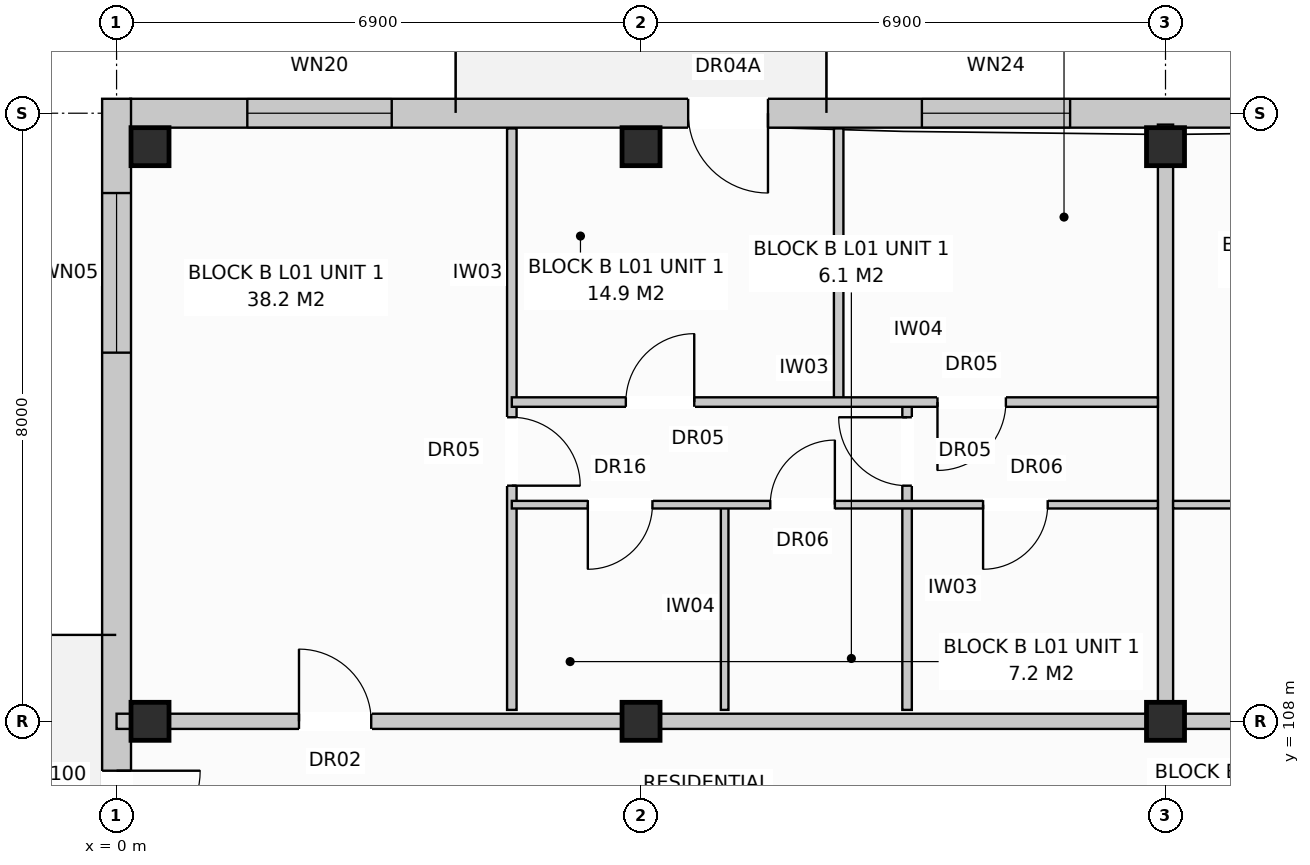
"""IFC4 building model, lengths in metres.
Left out: names, types, materials, properties, quantities, classifications, styles, units other than length and angle.
Written with IfcOpenShell. Run it as: python <this file> out.ifc"""

import sys

from ifc_helpers import new_model, si_unit, direction, frame, frame_2d, origin, origin_with_axes, origin_2d, place, context, subcontext, project, spatial, rectangle, extrude, element, fill, save


model = new_model("IFC4")
c1 = context("Model", 3, precision=1e-05, world=origin(), true_north=direction((0.0, 1.0)))
c2 = subcontext(c1, "Body", "Model", "MODEL_VIEW")
j1 = project(units=[si_unit("LENGTHUNIT", "METRE"), si_unit("PLANEANGLEUNIT", "RADIAN")], contexts=[c1])
p1 = place(None, origin())
s1 = spatial("IfcSite", under=j1, at=p1, CompositionType="ELEMENT")
p2 = place(p1, origin())
s2 = spatial("IfcBuilding", under=s1, at=p2, CompositionType="ELEMENT")
p3 = place(p2, frame((0.0, 0.0, 4.4)))
s3 = spatial("IfcBuildingStorey", under=s2, at=p3, CompositionType="ELEMENT", Elevation=4.4)
for number, where, z_axis, x_axis in (
    (1, (0.44, 108.0, 0.0), (0.0, 0.0, 1.0), (1.0, 0.0, 0.0)),
    (2, (0.44, 115.56, 0.0), (0.0, 0.0, 1.0), (1.0, 0.0, 0.0)),
    (3, (6.9, 108.0, 0.0), (0.0, 0.0, 1.0), (1.0, 0.0, 0.0)),
    (4, (6.9, 115.56, 0.0), (0.0, 0.0, 1.0), (1.0, 0.0, 0.0)),
    (5, (13.8, 108.0, 0.0), (0.0, 0.0, 1.0), (1.0, 0.0, 0.0)),
    (6, (13.8, 115.56, 0.0), (0.0, 0.0, 1.0), (1.0, 0.0, 0.0)),
):
    element("IfcColumn", number, at=place(p3, frame(where, z_axis=z_axis, x_axis=x_axis)), inside=s3, PredefinedType="COLUMN", context=c2, shape_type="SweptSolid", body=[
        extrude(rectangle(XDim=0.5, YDim=0.5, at=origin_2d()), origin(), (0.0, 0.0, 1.0), 3.6),
    ])
p4 = place(p3, frame((0.18, 116.0, 0.0), z_axis=(0.0, 0.0, 1.0), x_axis=(1.0, 0.0, 0.0)))
e7 = element("IfcWall", 7, at=p4, inside=s3, PredefinedType="STANDARD", context=c2, shape_type="SweptSolid", body=[
    extrude(rectangle(XDim=54.84, YDim=0.38, at=frame_2d((27.42, 0.0))), origin(), (0.0, 0.0, 1.0), 3.33),
])
p5 = place(p4, frame((7.34, 0.0, 0.0)))
e8 = element("IfcOpeningElement", 8, at=p5, cuts=e7, PredefinedType="OPENING", context=c2, shape_type="SweptSolid", body=[
    extrude(rectangle(XDim=1.05, YDim=2.12, at=frame_2d((0.525, 1.06))), frame((0.0, 0.202, 0.0), z_axis=(0.0, -1.0, 0.0), x_axis=(1.0, 0.0, 0.0)), (0.0, 0.0, 1.0), 0.404),
])
p6 = place(p4, frame((18.851, 0.0, 0.0)))
e9 = element("IfcOpeningElement", 9, at=p6, cuts=e7, PredefinedType="OPENING", context=c2, shape_type="SweptSolid", body=[
    extrude(rectangle(XDim=1.05, YDim=2.12, at=frame_2d((0.525, 1.06))), frame((0.0, 0.202, 0.0), z_axis=(0.0, -1.0, 0.0), x_axis=(1.0, 0.0, 0.0)), (0.0, 0.0, 1.0), 0.404),
])
p7 = place(p4, frame((32.651, 0.0, 0.0)))
e10 = element("IfcOpeningElement", 10, at=p7, cuts=e7, PredefinedType="OPENING", context=c2, shape_type="SweptSolid", body=[
    extrude(rectangle(XDim=1.05, YDim=2.12, at=frame_2d((0.525, 1.06))), frame((0.0, 0.202, 0.0), z_axis=(0.0, -1.0, 0.0), x_axis=(1.0, 0.0, 0.0)), (0.0, 0.0, 1.0), 0.404),
])
p8 = place(p4, frame((48.74, 0.0, 0.0)))
e11 = element("IfcOpeningElement", 11, at=p8, cuts=e7, PredefinedType="OPENING", context=c2, shape_type="SweptSolid", body=[
    extrude(rectangle(XDim=1.05, YDim=2.12, at=frame_2d((0.525, 1.06))), frame((0.0, 0.202, 0.0), z_axis=(0.0, -1.0, 0.0), x_axis=(1.0, 0.0, 0.0)), (0.0, 0.0, 1.0), 0.404),
])
p9 = place(p4, frame((1.54, 0.0, 0.8)))
e12 = element("IfcOpeningElement", 12, at=p9, cuts=e7, PredefinedType="OPENING", context=c2, shape_type="SweptSolid", body=[
    extrude(rectangle(XDim=1.9, YDim=1.85, at=frame_2d((0.95, 0.925))), frame((0.0, 0.202, 0.0), z_axis=(0.0, -1.0, 0.0), x_axis=(1.0, 0.0, 0.0)), (0.0, 0.0, 1.0), 0.404),
])
p10 = place(p4, frame((10.415, 0.0, 0.8)))
e13 = element("IfcOpeningElement", 13, at=p10, cuts=e7, PredefinedType="OPENING", context=c2, shape_type="SweptSolid", body=[
    extrude(rectangle(XDim=1.95, YDim=1.65, at=frame_2d((0.975, 0.825))), frame((0.0, 0.202, 0.0), z_axis=(0.0, -1.0, 0.0), x_axis=(1.0, 0.0, 0.0)), (0.0, 0.0, 1.0), 0.404),
])
p11 = place(p4, frame((14.89, 0.0, 0.8)))
e14 = element("IfcOpeningElement", 14, at=p11, cuts=e7, PredefinedType="OPENING", context=c2, shape_type="SweptSolid", body=[
    extrude(rectangle(XDim=1.8, YDim=1.7, at=frame_2d((0.9, 0.85))), frame((0.0, 0.202, 0.0), z_axis=(0.0, -1.0, 0.0), x_axis=(1.0, 0.0, 0.0)), (0.0, 0.0, 1.0), 0.404),
])
p12 = place(p4, frame((21.09, 0.0, 0.9)))
e15 = element("IfcOpeningElement", 15, at=p12, cuts=e7, PredefinedType="OPENING", context=c2, shape_type="SweptSolid", body=[
    extrude(rectangle(XDim=0.95, YDim=1.55, at=frame_2d((0.475, 0.775))), frame((0.0, 0.202, 0.0), z_axis=(0.0, -1.0, 0.0), x_axis=(1.0, 0.0, 0.0)), (0.0, 0.0, 1.0), 0.404),
])
p13 = place(p4, frame((23.815, 0.0, 0.8)))
e16 = element("IfcOpeningElement", 16, at=p13, cuts=e7, PredefinedType="OPENING", context=c2, shape_type="SweptSolid", body=[
    extrude(rectangle(XDim=1.95, YDim=1.65, at=frame_2d((0.975, 0.825))), frame((0.0, 0.202, 0.0), z_axis=(0.0, -1.0, 0.0), x_axis=(1.0, 0.0, 0.0)), (0.0, 0.0, 1.0), 0.404),
])
p14 = place(p4, frame((28.49, 0.0, 0.8)))
e17 = element("IfcOpeningElement", 17, at=p14, cuts=e7, PredefinedType="OPENING", context=c2, shape_type="SweptSolid", body=[
    extrude(rectangle(XDim=1.8, YDim=1.7, at=frame_2d((0.9, 0.85))), frame((0.0, 0.202, 0.0), z_axis=(0.0, -1.0, 0.0), x_axis=(1.0, 0.0, 0.0)), (0.0, 0.0, 1.0), 0.404),
])
p15 = place(p4, frame((35.34, 0.0, 0.8)))
e18 = element("IfcOpeningElement", 18, at=p15, cuts=e7, PredefinedType="OPENING", context=c2, shape_type="SweptSolid", body=[
    extrude(rectangle(XDim=1.9, YDim=1.85, at=frame_2d((0.95, 0.925))), frame((0.0, 0.202, 0.0), z_axis=(0.0, -1.0, 0.0), x_axis=(1.0, 0.0, 0.0)), (0.0, 0.0, 1.0), 0.404),
])
p16 = place(p4, frame((38.455, 0.0, 0.8)))
e19 = element("IfcOpeningElement", 19, at=p16, cuts=e7, PredefinedType="OPENING", context=c2, shape_type="SweptSolid", body=[
    extrude(rectangle(XDim=1.95, YDim=1.65, at=frame_2d((0.975, 0.825))), frame((0.0, 0.202, 0.0), z_axis=(0.0, -1.0, 0.0), x_axis=(1.0, 0.0, 0.0)), (0.0, 0.0, 1.0), 0.404),
])
p17 = place(p4, frame((42.99, 0.0, 0.8)))
e20 = element("IfcOpeningElement", 20, at=p17, cuts=e7, PredefinedType="OPENING", context=c2, shape_type="SweptSolid", body=[
    extrude(rectangle(XDim=1.8, YDim=1.7, at=frame_2d((0.9, 0.85))), frame((0.0, 0.202, 0.0), z_axis=(0.0, -1.0, 0.0), x_axis=(1.0, 0.0, 0.0)), (0.0, 0.0, 1.0), 0.404),
])
p18 = place(p4, frame((51.84, 0.0, 0.8)))
e21 = element("IfcOpeningElement", 21, at=p18, cuts=e7, PredefinedType="OPENING", context=c2, shape_type="SweptSolid", body=[
    extrude(rectangle(XDim=1.9, YDim=1.85, at=frame_2d((0.95, 0.925))), frame((0.0, 0.202, 0.0), z_axis=(0.0, -1.0, 0.0), x_axis=(1.0, 0.0, 0.0)), (0.0, 0.0, 1.0), 0.404),
])
p19 = place(p3, frame((0.0, 97.41, 0.0), z_axis=(0.0, 0.0, 1.0), x_axis=(0.0, 1.0, 0.0)))
e22 = element("IfcWall", 22, at=p19, inside=s3, PredefinedType="STANDARD", context=c2, shape_type="SweptSolid", body=[
    extrude(rectangle(XDim=18.78, YDim=0.38, at=frame_2d((9.39, 0.0))), origin(), (0.0, 0.0, 1.0), 3.33),
])
p20 = place(p19, frame((8.84, 0.0, 0.0)))
e23 = element("IfcOpeningElement", 23, at=p20, cuts=e22, PredefinedType="OPENING", context=c2, shape_type="SweptSolid", body=[
    extrude(rectangle(XDim=1.1, YDim=2.1, at=frame_2d((0.55, 1.05))), frame((0.0, 0.202, 0.0), z_axis=(0.0, -1.0, 0.0), x_axis=(1.0, 0.0, 0.0)), (0.0, 0.0, 1.0), 0.404),
])
p21 = place(p19, frame((1.24, 0.0, 0.72)))
e24 = element("IfcOpeningElement", 24, at=p21, cuts=e22, PredefinedType="OPENING", context=c2, shape_type="SweptSolid", body=[
    extrude(rectangle(XDim=2.1, YDim=1.9, at=frame_2d((1.05, 0.95))), frame((0.0, 0.202, 0.0), z_axis=(0.0, -1.0, 0.0), x_axis=(1.0, 0.0, 0.0)), (0.0, 0.0, 1.0), 0.404),
])
p22 = place(p19, frame((15.44, 0.0, 0.72)))
e25 = element("IfcOpeningElement", 25, at=p22, cuts=e22, PredefinedType="OPENING", context=c2, shape_type="SweptSolid", body=[
    extrude(rectangle(XDim=2.1, YDim=1.9, at=frame_2d((1.05, 0.95))), frame((0.0, 0.202, 0.0), z_axis=(0.0, -1.0, 0.0), x_axis=(1.0, 0.0, 0.0)), (0.0, 0.0, 1.0), 0.404),
])
p23 = place(p3, frame((13.8, 108.15, 0.0), z_axis=(0.0, 0.0, 1.0), x_axis=(0.0, 1.0, 0.0)))
e26 = element("IfcWall", 26, at=p23, inside=s3, PredefinedType="PARTITIONING", context=c2, shape_type="SweptSolid", body=[
    extrude(rectangle(XDim=7.7, YDim=0.2, at=frame_2d((3.85, 0.0))), origin(), (0.0, 0.0, 1.0), 3.33),
])
p24 = place(p3, frame((0.0, 108.0, 0.0), z_axis=(0.0, 0.0, 1.0), x_axis=(1.0, 0.0, 0.0)))
e27 = element("IfcWall", 27, at=p24, inside=s3, PredefinedType="PARTITIONING", context=c2, shape_type="SweptSolid", body=[
    extrude(rectangle(XDim=13.8, YDim=0.2, at=frame_2d((6.9, 0.0))), origin(), (0.0, 0.0, 1.0), 2.77),
])
p25 = place(p24, frame((2.4, 0.0, 0.0)))
e28 = element("IfcOpeningElement", 28, at=p25, cuts=e27, PredefinedType="OPENING", context=c2, shape_type="SweptSolid", body=[
    extrude(rectangle(XDim=0.95, YDim=2.15, at=frame_2d((0.475, 1.075))), frame((0.0, 0.112, 0.0), z_axis=(0.0, -1.0, 0.0), x_axis=(1.0, 0.0, 0.0)), (0.0, 0.0, 1.0), 0.224),
])
p26 = place(p3, frame((5.2, 108.15, 0.0), z_axis=(0.0, 0.0, 1.0), x_axis=(0.0, 1.0, 0.0)))
e29 = element("IfcWall", 29, at=p26, inside=s3, PredefinedType="PARTITIONING", context=c2, shape_type="SweptSolid", body=[
    extrude(rectangle(XDim=7.65, YDim=0.125, at=frame_2d((3.825, 0.0))), origin(), (0.0, 0.0, 1.0), 3.33),
])
p27 = place(p26, frame((2.95, 0.0, 0.0)))
e30 = element("IfcOpeningElement", 30, at=p27, cuts=e29, PredefinedType="OPENING", context=c2, shape_type="SweptSolid", body=[
    extrude(rectangle(XDim=0.9, YDim=2.1, at=frame_2d((0.45, 1.05))), frame((0.0, 0.074, 0.0), z_axis=(0.0, -1.0, 0.0), x_axis=(1.0, 0.0, 0.0)), (0.0, 0.0, 1.0), 0.149),
])
p28 = place(p3, frame((8.0, 108.15, 0.0), z_axis=(0.0, 0.0, 1.0), x_axis=(0.0, 1.0, 0.0)))
e31 = element("IfcWall", 31, at=p28, inside=s3, PredefinedType="PARTITIONING", context=c2, shape_type="SweptSolid", body=[
    extrude(rectangle(XDim=2.7, YDim=0.1, at=frame_2d((1.35, 0.0))), origin(), (0.0, 0.0, 1.0), 3.33),
])
p29 = place(p3, frame((10.4, 108.15, 0.0), z_axis=(0.0, 0.0, 1.0), x_axis=(0.0, 1.0, 0.0)))
e32 = element("IfcWall", 32, at=p29, inside=s3, PredefinedType="PARTITIONING", context=c2, shape_type="SweptSolid", body=[
    extrude(rectangle(XDim=4.05, YDim=0.125, at=frame_2d((2.025, 0.0))), origin(), (0.0, 0.0, 1.0), 2.99),
])
p30 = place(p29, frame((2.95, 0.0, 0.0)))
e33 = element("IfcOpeningElement", 33, at=p30, cuts=e32, PredefinedType="OPENING", context=c2, shape_type="SweptSolid", body=[
    extrude(rectangle(XDim=0.9, YDim=2.1, at=frame_2d((0.45, 1.05))), frame((0.0, 0.074, 0.0), z_axis=(0.0, -1.0, 0.0), x_axis=(1.0, 0.0, 0.0)), (0.0, 0.0, 1.0), 0.149),
])
p31 = place(p3, frame((9.5, 112.2, 0.0), z_axis=(0.0, 0.0, 1.0), x_axis=(0.0, 1.0, 0.0)))
e34 = element("IfcWall", 34, at=p31, inside=s3, PredefinedType="PARTITIONING", context=c2, shape_type="SweptSolid", body=[
    extrude(rectangle(XDim=3.6, YDim=0.125, at=frame_2d((1.8, 0.0))), origin(), (0.0, 0.0, 1.0), 3.33),
])
p32 = place(p3, frame((5.2, 110.85, 0.0), z_axis=(0.0, 0.0, 1.0), x_axis=(1.0, 0.0, 0.0)))
e35 = element("IfcWall", 35, at=p32, inside=s3, PredefinedType="PARTITIONING", context=c2, shape_type="SweptSolid", body=[
    extrude(rectangle(XDim=8.5, YDim=0.1, at=frame_2d((4.25, 0.0))), origin(), (0.0, 0.0, 1.0), 3.33),
])
p33 = place(p32, frame((1.0, 0.0, 0.0)))
e36 = element("IfcOpeningElement", 36, at=p33, cuts=e35, PredefinedType="OPENING", context=c2, shape_type="SweptSolid", body=[
    extrude(rectangle(XDim=0.85, YDim=2.1, at=frame_2d((0.425, 1.05))), frame((0.0, 0.062, 0.0), z_axis=(0.0, -1.0, 0.0), x_axis=(1.0, 0.0, 0.0)), (0.0, 0.0, 1.0), 0.124),
])
p34 = place(p32, frame((3.4, 0.0, 0.0)))
e37 = element("IfcOpeningElement", 37, at=p34, cuts=e35, PredefinedType="OPENING", context=c2, shape_type="SweptSolid", body=[
    extrude(rectangle(XDim=0.85, YDim=2.05, at=frame_2d((0.425, 1.025))), frame((0.0, 0.062, 0.0), z_axis=(0.0, -1.0, 0.0), x_axis=(1.0, 0.0, 0.0)), (0.0, 0.0, 1.0), 0.124),
])
p35 = place(p32, frame((6.2, 0.0, 0.0)))
e38 = element("IfcOpeningElement", 38, at=p35, cuts=e35, PredefinedType="OPENING", context=c2, shape_type="SweptSolid", body=[
    extrude(rectangle(XDim=0.85, YDim=2.05, at=frame_2d((0.425, 1.025))), frame((0.0, 0.062, 0.0), z_axis=(0.0, -1.0, 0.0), x_axis=(1.0, 0.0, 0.0)), (0.0, 0.0, 1.0), 0.124),
])
p36 = place(p3, frame((5.2, 112.2, 0.0), z_axis=(0.0, 0.0, 1.0), x_axis=(1.0, 0.0, 0.0)))
e39 = element("IfcWall", 39, at=p36, inside=s3, PredefinedType="PARTITIONING", context=c2, shape_type="SweptSolid", body=[
    extrude(rectangle(XDim=8.5, YDim=0.125, at=frame_2d((4.25, 0.0))), origin(), (0.0, 0.0, 1.0), 3.33),
])
p37 = place(p36, frame((1.5, 0.0, 0.0)))
e40 = element("IfcOpeningElement", 40, at=p37, cuts=e39, PredefinedType="OPENING", context=c2, shape_type="SweptSolid", body=[
    extrude(rectangle(XDim=0.9, YDim=2.1, at=frame_2d((0.45, 1.05))), frame((0.0, 0.074, 0.0), z_axis=(0.0, -1.0, 0.0), x_axis=(1.0, 0.0, 0.0)), (0.0, 0.0, 1.0), 0.149),
])
p38 = place(p36, frame((5.6, 0.0, 0.0)))
e41 = element("IfcOpeningElement", 41, at=p38, cuts=e39, PredefinedType="OPENING", context=c2, shape_type="SweptSolid", body=[
    extrude(rectangle(XDim=0.9, YDim=2.1, at=frame_2d((0.45, 1.05))), frame((0.0, 0.074, 0.0), z_axis=(0.0, -1.0, 0.0), x_axis=(1.0, 0.0, 0.0)), (0.0, 0.0, 1.0), 0.149),
])
p39 = place(p3, frame((13.8, 108.0, 0.0), z_axis=(0.0, 0.0, 1.0), x_axis=(1.0, 0.0, 0.0)))
e42 = element("IfcWall", 42, at=p39, inside=s3, PredefinedType="PARTITIONING", context=c2, shape_type="SweptSolid", body=[
    extrude(rectangle(XDim=13.8, YDim=0.2, at=frame_2d((6.9, 0.0))), origin(), (0.0, 0.0, 1.0), 2.77),
])
p40 = place(p39, frame((9.6, 0.0, 0.0)))
e43 = element("IfcOpeningElement", 43, at=p40, cuts=e42, PredefinedType="OPENING", context=c2, shape_type="SweptSolid", body=[
    extrude(rectangle(XDim=0.95, YDim=2.15, at=frame_2d((0.475, 1.075))), frame((0.0, 0.112, 0.0), z_axis=(0.0, -1.0, 0.0), x_axis=(1.0, 0.0, 0.0)), (0.0, 0.0, 1.0), 0.224),
])
p41 = place(p3, frame((13.9, 110.85, 0.0), z_axis=(0.0, 0.0, 1.0), x_axis=(1.0, 0.0, 0.0)))
e44 = element("IfcWall", 44, at=p41, inside=s3, PredefinedType="PARTITIONING", context=c2, shape_type="SweptSolid", body=[
    extrude(rectangle(XDim=8.6, YDim=0.1, at=frame_2d((4.3, 0.0))), origin(), (0.0, 0.0, 1.0), 3.33),
])
p42 = place(p41, frame((1.4, 0.0, 0.0)))
e45 = element("IfcOpeningElement", 45, at=p42, cuts=e44, PredefinedType="OPENING", context=c2, shape_type="SweptSolid", body=[
    extrude(rectangle(XDim=0.85, YDim=2.05, at=frame_2d((0.425, 1.025))), frame((0.0, 0.062, 0.0), z_axis=(0.0, -1.0, 0.0), x_axis=(1.0, 0.0, 0.0)), (0.0, 0.0, 1.0), 0.124),
])
p43 = place(p41, frame((4.65, 0.0, 0.0)))
e46 = element("IfcOpeningElement", 46, at=p43, cuts=e44, PredefinedType="OPENING", context=c2, shape_type="SweptSolid", body=[
    extrude(rectangle(XDim=0.85, YDim=2.05, at=frame_2d((0.425, 1.025))), frame((0.0, 0.062, 0.0), z_axis=(0.0, -1.0, 0.0), x_axis=(1.0, 0.0, 0.0)), (0.0, 0.0, 1.0), 0.124),
])
p44 = place(p41, frame((6.8, 0.0, 0.0)))
e47 = element("IfcOpeningElement", 47, at=p44, cuts=e44, PredefinedType="OPENING", context=c2, shape_type="SweptSolid", body=[
    extrude(rectangle(XDim=0.85, YDim=2.1, at=frame_2d((0.425, 1.05))), frame((0.0, 0.062, 0.0), z_axis=(0.0, -1.0, 0.0), x_axis=(1.0, 0.0, 0.0)), (0.0, 0.0, 1.0), 0.124),
])
p45 = place(p5, frame((1.05, 0.0, 0.0), z_axis=(0.0, 0.0, 1.0), x_axis=(-1.0, 0.0, 0.0)))
e48 = element("IfcDoor", 48, at=p45, inside=s3, OperationType="SINGLE_SWING_RIGHT", PredefinedType="DOOR", context=c2, shape_type="SweptSolid", body=[
    extrude(rectangle(XDim=1.05, YDim=2.12, at=frame_2d((0.525, 1.06))), frame((0.0, 0.025, 0.0), z_axis=(0.0, -1.0, 0.0), x_axis=(1.0, 0.0, 0.0)), (0.0, 0.0, 1.0), 0.05),
])
fill(e8, e48)
p46 = place(p9, origin_with_axes())
e49 = element("IfcWindow", 49, at=p46, inside=s3, PartitioningType="SINGLE_PANEL", PredefinedType="WINDOW", context=c2, shape_type="SweptSolid", body=[
    extrude(rectangle(XDim=1.9, YDim=1.85, at=frame_2d((0.95, 0.925))), frame((0.0, 0.03, 0.0), z_axis=(0.0, -1.0, 0.0), x_axis=(1.0, 0.0, 0.0)), (0.0, 0.0, 1.0), 0.06),
])
fill(e12, e49)
p47 = place(p10, origin_with_axes())
e50 = element("IfcWindow", 50, at=p47, inside=s3, PartitioningType="SINGLE_PANEL", PredefinedType="WINDOW", context=c2, shape_type="SweptSolid", body=[
    extrude(rectangle(XDim=1.95, YDim=1.65, at=frame_2d((0.975, 0.825))), frame((0.0, 0.03, 0.0), z_axis=(0.0, -1.0, 0.0), x_axis=(1.0, 0.0, 0.0)), (0.0, 0.0, 1.0), 0.06),
])
fill(e13, e50)
p48 = place(p20, frame((1.1, 0.0, 0.0), z_axis=(0.0, 0.0, 1.0), x_axis=(-1.0, 0.0, 0.0)))
e51 = element("IfcDoor", 51, at=p48, inside=s3, OperationType="SINGLE_SWING_RIGHT", PredefinedType="DOOR", context=c2, shape_type="SweptSolid", body=[
    extrude(rectangle(XDim=1.1, YDim=2.1, at=frame_2d((0.55, 1.05))), frame((0.0, 0.025, 0.0), z_axis=(0.0, -1.0, 0.0), x_axis=(1.0, 0.0, 0.0)), (0.0, 0.0, 1.0), 0.05),
])
fill(e23, e51)
p49 = place(p22, origin_with_axes())
e52 = element("IfcWindow", 52, at=p49, inside=s3, PartitioningType="SINGLE_PANEL", PredefinedType="WINDOW", context=c2, shape_type="SweptSolid", body=[
    extrude(rectangle(XDim=2.1, YDim=1.9, at=frame_2d((1.05, 0.95))), frame((0.0, 0.03, 0.0), z_axis=(0.0, -1.0, 0.0), x_axis=(1.0, 0.0, 0.0)), (0.0, 0.0, 1.0), 0.06),
])
fill(e25, e52)
p50 = place(p25, origin_with_axes())
e53 = element("IfcDoor", 53, at=p50, inside=s3, OperationType="SINGLE_SWING_LEFT", PredefinedType="DOOR", context=c2, shape_type="SweptSolid", body=[
    extrude(rectangle(XDim=0.95, YDim=2.15, at=frame_2d((0.475, 1.075))), frame((0.0, 0.025, 0.0), z_axis=(0.0, -1.0, 0.0), x_axis=(1.0, 0.0, 0.0)), (0.0, 0.0, 1.0), 0.05),
])
fill(e28, e53)
p51 = place(p27, frame((0.9, 0.0, 0.0), z_axis=(0.0, 0.0, 1.0), x_axis=(-1.0, 0.0, 0.0)))
e54 = element("IfcDoor", 54, at=p51, inside=s3, OperationType="SINGLE_SWING_LEFT", PredefinedType="DOOR", context=c2, shape_type="SweptSolid", body=[
    extrude(rectangle(XDim=0.9, YDim=2.1, at=frame_2d((0.45, 1.05))), frame((0.0, 0.025, 0.0), z_axis=(0.0, -1.0, 0.0), x_axis=(1.0, 0.0, 0.0)), (0.0, 0.0, 1.0), 0.05),
])
fill(e30, e54)
p52 = place(p30, origin_with_axes())
e55 = element("IfcDoor", 55, at=p52, inside=s3, OperationType="SINGLE_SWING_RIGHT", PredefinedType="DOOR", context=c2, shape_type="SweptSolid", body=[
    extrude(rectangle(XDim=0.9, YDim=2.1, at=frame_2d((0.45, 1.05))), frame((0.0, 0.025, 0.0), z_axis=(0.0, -1.0, 0.0), x_axis=(1.0, 0.0, 0.0)), (0.0, 0.0, 1.0), 0.05),
])
fill(e33, e55)
p53 = place(p33, frame((0.85, 0.0, 0.0), z_axis=(0.0, 0.0, 1.0), x_axis=(-1.0, 0.0, 0.0)))
e56 = element("IfcDoor", 56, at=p53, inside=s3, OperationType="SINGLE_SWING_LEFT", PredefinedType="DOOR", context=c2, shape_type="SweptSolid", body=[
    extrude(rectangle(XDim=0.85, YDim=2.1, at=frame_2d((0.425, 1.05))), frame((0.0, 0.025, 0.0), z_axis=(0.0, -1.0, 0.0), x_axis=(1.0, 0.0, 0.0)), (0.0, 0.0, 1.0), 0.05),
])
fill(e36, e56)
p54 = place(p34, origin_with_axes())
e57 = element("IfcDoor", 57, at=p54, inside=s3, OperationType="SINGLE_SWING_RIGHT", PredefinedType="DOOR", context=c2, shape_type="SweptSolid", body=[
    extrude(rectangle(XDim=0.85, YDim=2.05, at=frame_2d((0.425, 1.025))), frame((0.0, 0.025, 0.0), z_axis=(0.0, -1.0, 0.0), x_axis=(1.0, 0.0, 0.0)), (0.0, 0.0, 1.0), 0.05),
])
fill(e37, e57)
p55 = place(p35, frame((0.85, 0.0, 0.0), z_axis=(0.0, 0.0, 1.0), x_axis=(-1.0, 0.0, 0.0)))
e58 = element("IfcDoor", 58, at=p55, inside=s3, OperationType="SINGLE_SWING_LEFT", PredefinedType="DOOR", context=c2, shape_type="SweptSolid", body=[
    extrude(rectangle(XDim=0.85, YDim=2.05, at=frame_2d((0.425, 1.025))), frame((0.0, 0.025, 0.0), z_axis=(0.0, -1.0, 0.0), x_axis=(1.0, 0.0, 0.0)), (0.0, 0.0, 1.0), 0.05),
])
fill(e38, e58)
p56 = place(p37, origin_with_axes())
e59 = element("IfcDoor", 59, at=p56, inside=s3, OperationType="SINGLE_SWING_RIGHT", PredefinedType="DOOR", context=c2, shape_type="SweptSolid", body=[
    extrude(rectangle(XDim=0.9, YDim=2.1, at=frame_2d((0.45, 1.05))), frame((0.0, 0.025, 0.0), z_axis=(0.0, -1.0, 0.0), x_axis=(1.0, 0.0, 0.0)), (0.0, 0.0, 1.0), 0.05),
])
fill(e40, e59)
p57 = place(p38, frame((0.9, 0.0, 0.0), z_axis=(0.0, 0.0, 1.0), x_axis=(-1.0, 0.0, 0.0)))
e60 = element("IfcDoor", 60, at=p57, inside=s3, OperationType="SINGLE_SWING_LEFT", PredefinedType="DOOR", context=c2, shape_type="SweptSolid", body=[
    extrude(rectangle(XDim=0.9, YDim=2.1, at=frame_2d((0.45, 1.05))), frame((0.0, 0.025, 0.0), z_axis=(0.0, -1.0, 0.0), x_axis=(1.0, 0.0, 0.0)), (0.0, 0.0, 1.0), 0.05),
])
fill(e41, e60)
save(model, sys.argv[1])
